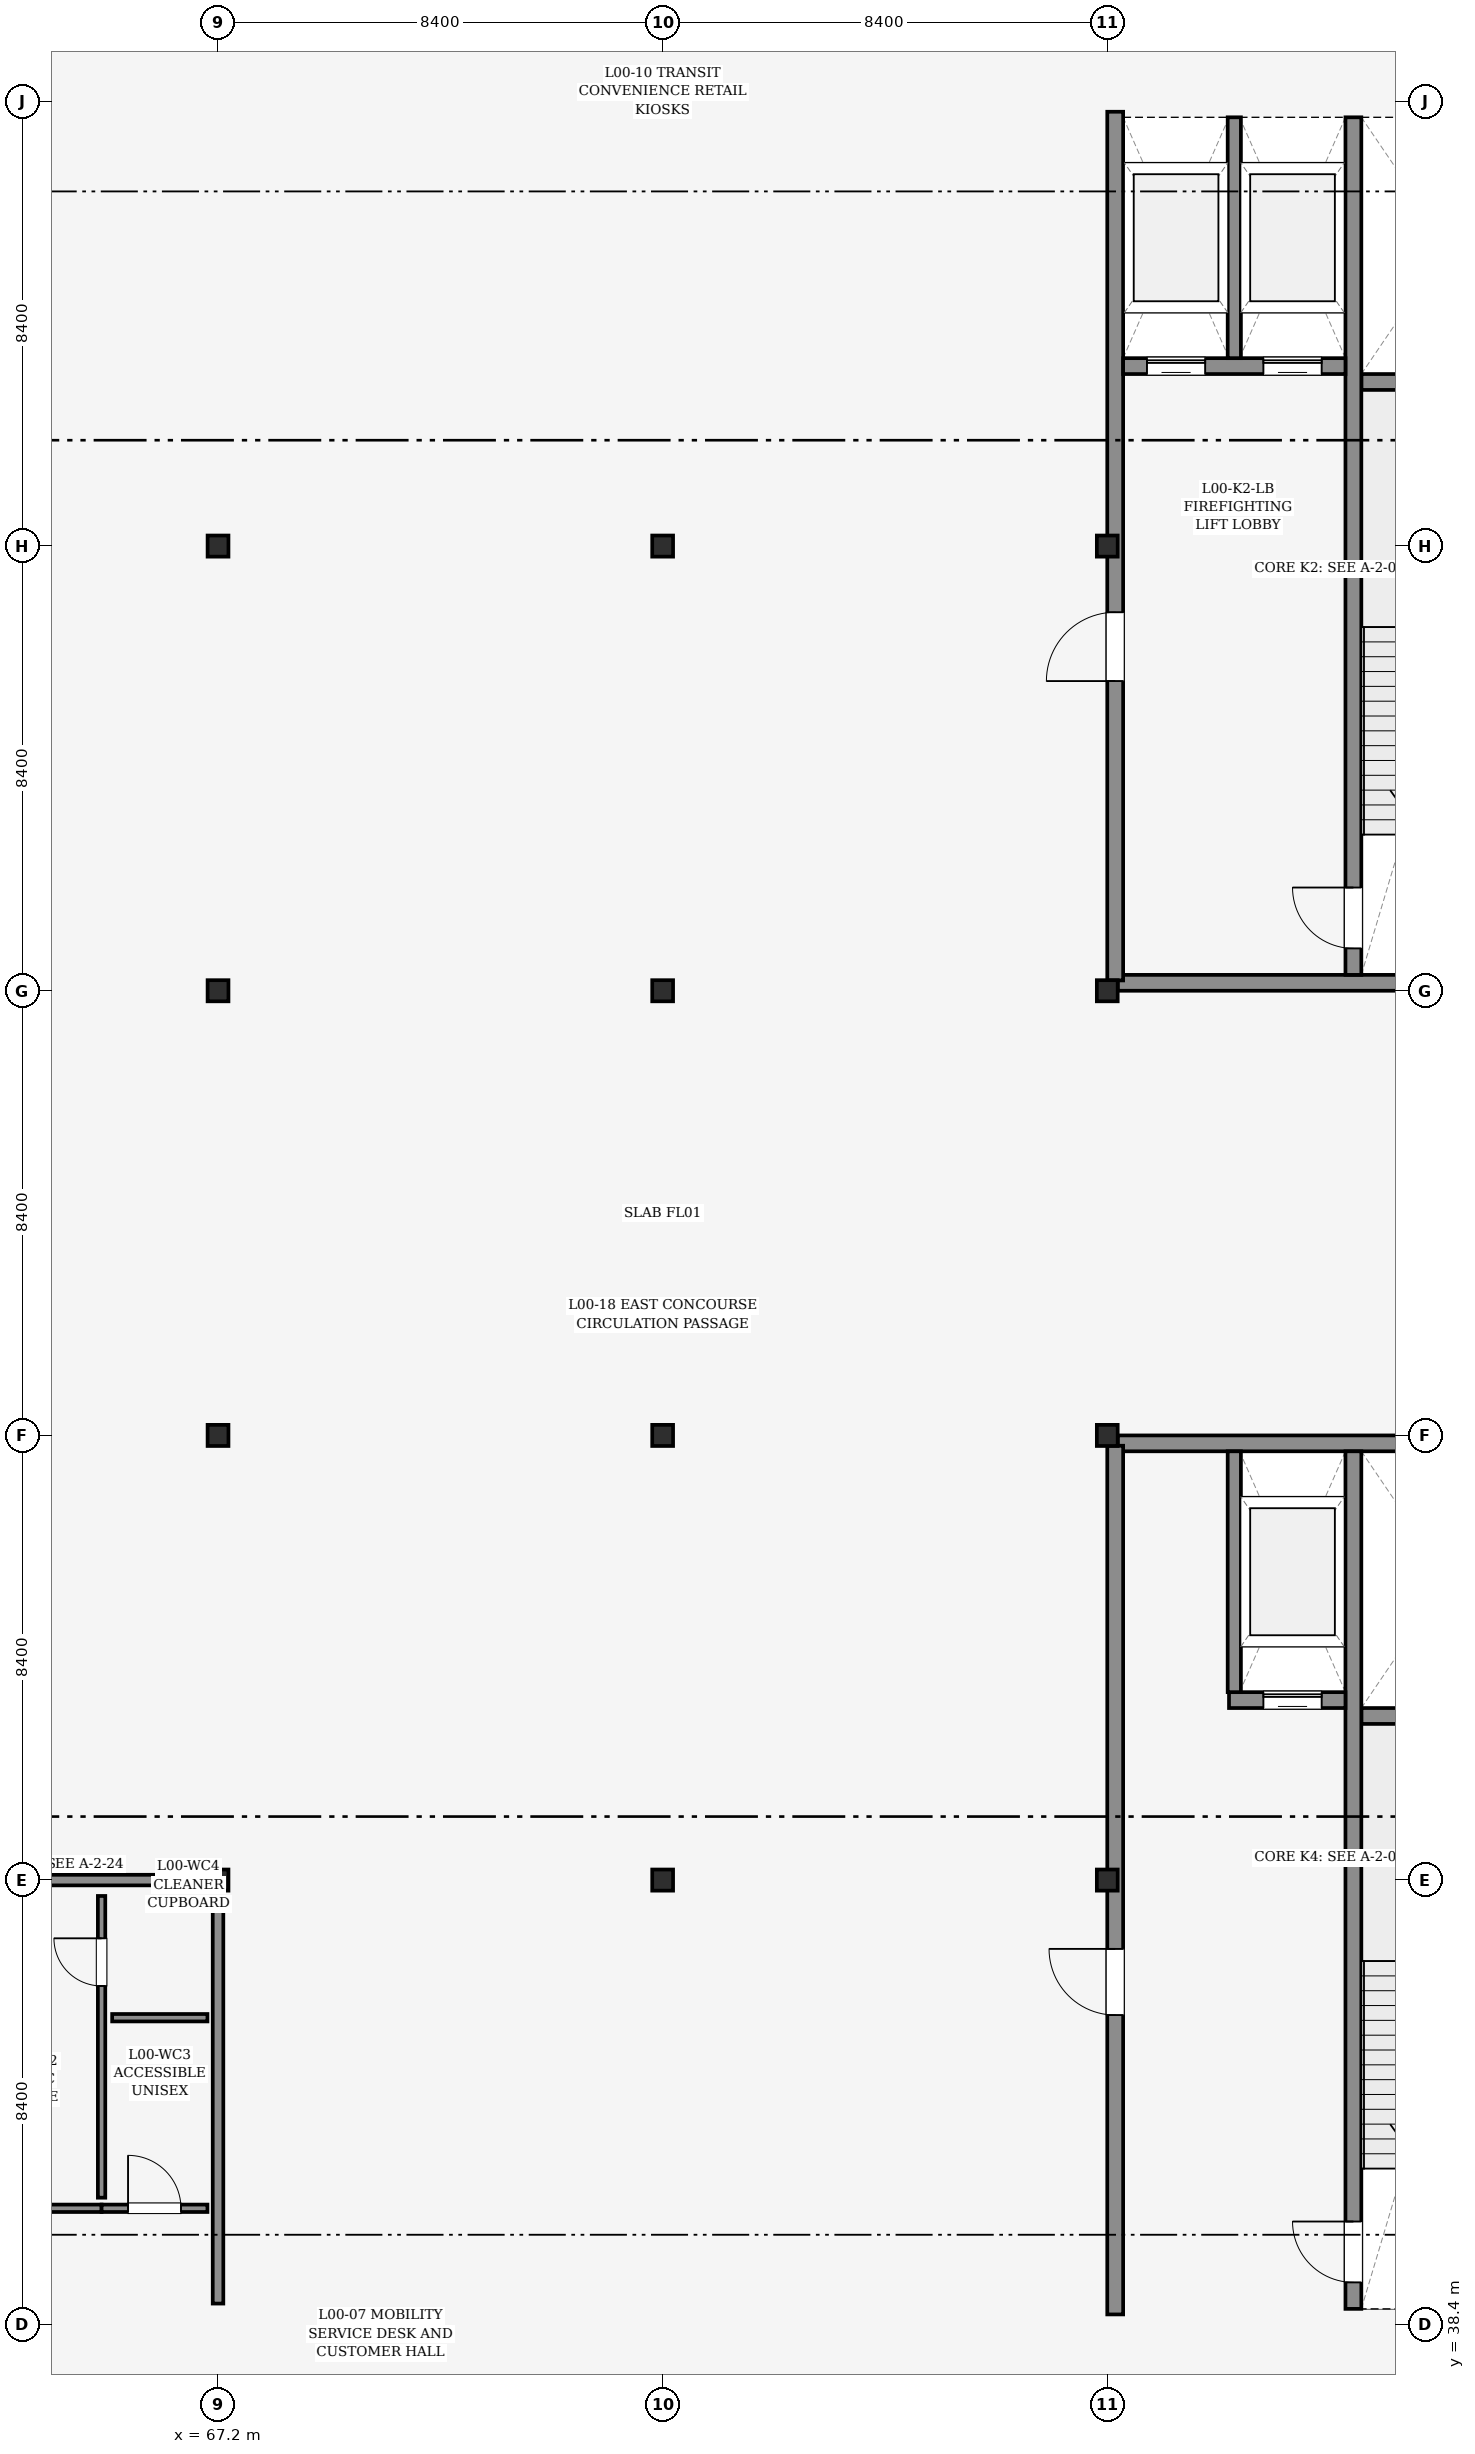
"""IFC4 building model, lengths in metres.
Left out: names, types, materials, properties, quantities, classifications, styles, units other than length and angle.
Written with IfcOpenShell. Run it as: python <this file> out.ifc"""

import sys

from ifc_helpers import new_model, si_unit, direction, frame, frame_2d, origin, origin_2d, place, context, subcontext, project, spatial, rectangle, i_section, extrude, element, fill, save


model = new_model("IFC4")
c1 = context("Model", 3, precision=1e-05, world=origin(), true_north=direction((0.0, 1.0)))
c2 = subcontext(c1, "Body", "Model", "MODEL_VIEW")
j1 = project(units=[si_unit("LENGTHUNIT", "METRE"), si_unit("PLANEANGLEUNIT", "RADIAN")], contexts=[c1])
p1 = place(None, origin())
s1 = spatial("IfcSite", under=j1, at=p1, CompositionType="ELEMENT")
p2 = place(p1, origin())
s2 = spatial("IfcBuilding", under=s1, at=p2, CompositionType="ELEMENT")
p3 = place(p2, origin())
s3 = spatial("IfcBuildingStorey", under=s2, at=p3, CompositionType="ELEMENT", Elevation=0.0)
for number, where, z_axis, x_axis in (
    (1, (67.2, 38.4, 0.0), (0.0, 0.0, 1.0), (1.0, 0.0, 0.0)),
    (2, (67.2, 46.8, 0.0), (0.0, 0.0, 1.0), (1.0, 0.0, 0.0)),
    (3, (67.2, 55.2, 0.0), (0.0, 0.0, 1.0), (1.0, 0.0, 0.0)),
    (4, (67.2, 63.6, 0.0), (0.0, 0.0, 1.0), (1.0, 0.0, 0.0)),
    (5, (67.2, 72.0, 0.0), (0.0, 0.0, 1.0), (1.0, 0.0, 0.0)),
    (6, (67.2, 80.4, 0.0), (0.0, 0.0, 1.0), (1.0, 0.0, 0.0)),
    (7, (75.6, 38.4, 0.0), (0.0, 0.0, 1.0), (1.0, 0.0, 0.0)),
    (8, (75.6, 46.8, 0.0), (0.0, 0.0, 1.0), (1.0, 0.0, 0.0)),
    (9, (75.6, 55.2, 0.0), (0.0, 0.0, 1.0), (1.0, 0.0, 0.0)),
    (10, (75.6, 63.6, 0.0), (0.0, 0.0, 1.0), (1.0, 0.0, 0.0)),
    (11, (75.6, 72.0, 0.0), (0.0, 0.0, 1.0), (1.0, 0.0, 0.0)),
    (12, (75.6, 80.4, 0.0), (0.0, 0.0, 1.0), (1.0, 0.0, 0.0)),
    (13, (84.0, 38.4, 0.0), (0.0, 0.0, 1.0), (1.0, 0.0, 0.0)),
    (14, (84.0, 46.8, 0.0), (0.0, 0.0, 1.0), (1.0, 0.0, 0.0)),
    (15, (84.0, 55.2, 0.0), (0.0, 0.0, 1.0), (1.0, 0.0, 0.0)),
    (16, (84.0, 63.6, 0.0), (0.0, 0.0, 1.0), (1.0, 0.0, 0.0)),
    (17, (84.0, 72.0, 0.0), (0.0, 0.0, 1.0), (1.0, 0.0, 0.0)),
    (18, (84.0, 80.4, 0.0), (0.0, 0.0, 1.0), (1.0, 0.0, 0.0)),
):
    element("IfcColumn", number, at=place(p3, frame(where, z_axis=z_axis, x_axis=x_axis)), inside=s3, PredefinedType="COLUMN", context=c2, shape_type="SweptSolid", body=[
        extrude(i_section(OverallWidth=0.399, OverallDepth=0.394, WebThickness=0.023, FlangeThickness=0.037, FilletRadius=0.015, at=origin_2d()), origin(), (0.0, 0.0, 1.0), 5.4),
    ])
for number, where, z_axis, x_axis in (
    (19, (84.198, 63.75, 0.0), (0.0, 0.0, 1.0), (1.0, 0.0, 0.0)),
    (20, (84.198, 80.25, 0.0), (0.0, 0.0, 1.0), (1.0, 0.0, 0.0)),
):
    element("IfcWall", number, at=place(p3, frame(where, z_axis=z_axis, x_axis=x_axis)), inside=s3, PredefinedType="SHEAR", context=c2, shape_type="SweptSolid", body=[
        extrude(rectangle(XDim=8.005, YDim=0.3, at=frame_2d((4.002, 0.0))), origin(), (0.0, 0.0, 1.0), 5.18),
    ])
p4 = place(p3, frame((88.8, 75.1, 0.0), z_axis=(0.0, 0.0, 1.0), x_axis=(1.0, 0.0, 0.0)))
e21 = element("IfcWall", 21, at=p4, inside=s3, PredefinedType="SHEAR", context=c2, shape_type="SweptSolid", body=[
    extrude(rectangle(XDim=3.3, YDim=0.3, at=frame_2d((1.65, 0.0))), origin(), (0.0, 0.0, 1.0), 5.18),
])
p5 = place(p3, frame((84.15, 63.795, 0.0), z_axis=(0.0, 0.0, 1.0), x_axis=(0.0, 1.0, 0.0)))
e22 = element("IfcWall", 22, at=p5, inside=s3, PredefinedType="SHEAR", context=c2, shape_type="SweptSolid", body=[
    extrude(rectangle(XDim=16.41, YDim=0.3, at=frame_2d((8.205, 0.0))), origin(), (0.0, 0.0, 1.0), 5.18),
])
p6 = place(p5, frame((5.655, 0.0, 0.0)))
e23 = element("IfcOpeningElement", 23, at=p6, cuts=e22, PredefinedType="OPENING", context=c2, shape_type="SweptSolid", body=[
    extrude(rectangle(XDim=1.3, YDim=2.2, at=frame_2d((0.65, 1.1))), frame((0.0, 0.16, 0.0), z_axis=(0.0, -1.0, 0.0), x_axis=(1.0, 0.0, 0.0)), (0.0, 0.0, 1.0), 0.32),
])
p7 = place(p3, frame((88.65, 63.9, 0.0), z_axis=(0.0, 0.0, 1.0), x_axis=(0.0, 1.0, 0.0)))
e24 = element("IfcWall", 24, at=p7, inside=s3, PredefinedType="SHEAR", context=c2, shape_type="SweptSolid", body=[
    extrude(rectangle(XDim=16.2, YDim=0.3, at=frame_2d((8.1, 0.0))), origin(), (0.0, 0.0, 1.0), 5.18),
])
p8 = place(p7, frame((0.5, 0.0, 0.0)))
e25 = element("IfcOpeningElement", 25, at=p8, cuts=e24, PredefinedType="OPENING", context=c2, shape_type="SweptSolid", body=[
    extrude(rectangle(XDim=1.15, YDim=2.15, at=frame_2d((0.575, 1.075))), frame((0.0, 0.16, 0.0), z_axis=(0.0, -1.0, 0.0), x_axis=(1.0, 0.0, 0.0)), (0.0, 0.0, 1.0), 0.32),
])
p9 = place(p3, frame((84.3, 75.4, 0.0), z_axis=(0.0, 0.0, 1.0), x_axis=(1.0, 0.0, 0.0)))
e26 = element("IfcWall", 26, at=p9, inside=s3, PredefinedType="SHEAR", context=c2, shape_type="SweptSolid", body=[
    extrude(rectangle(XDim=4.2, YDim=0.3, at=frame_2d((2.1, 0.0))), origin(), (0.0, 0.0, 1.0), 5.18),
])
p10 = place(p9, frame((0.45, 0.0, 0.0)))
e27 = element("IfcOpeningElement", 27, at=p10, cuts=e26, PredefinedType="OPENING", context=c2, shape_type="SweptSolid", body=[
    extrude(rectangle(XDim=1.1, YDim=2.2, at=frame_2d((0.55, 1.1))), frame((0.0, 0.16, 0.0), z_axis=(0.0, -1.0, 0.0), x_axis=(1.0, 0.0, 0.0)), (0.0, 0.0, 1.0), 0.32),
])
p11 = place(p9, frame((2.65, 0.0, 0.0)))
e28 = element("IfcOpeningElement", 28, at=p11, cuts=e26, PredefinedType="OPENING", context=c2, shape_type="SweptSolid", body=[
    extrude(rectangle(XDim=1.1, YDim=2.2, at=frame_2d((0.55, 1.1))), frame((0.0, 0.16, 0.0), z_axis=(0.0, -1.0, 0.0), x_axis=(1.0, 0.0, 0.0)), (0.0, 0.0, 1.0), 0.32),
])
p12 = place(p3, frame((86.4, 75.55, 0.0), z_axis=(0.0, 0.0, 1.0), x_axis=(0.0, 1.0, 0.0)))
e29 = element("IfcWall", 29, at=p12, inside=s3, PredefinedType="PARTITIONING", context=c2, shape_type="SweptSolid", body=[
    extrude(rectangle(XDim=4.55, YDim=0.25, at=frame_2d((2.275, 0.0))), origin(), (0.0, 0.0, 1.0), 4.325),
])
for number, where, z_axis, x_axis in (
    (30, (84.198, 38.55, 0.0), (0.0, 0.0, 1.0), (1.0, 0.0, 0.0)),
    (31, (84.198, 55.05, 0.0), (0.0, 0.0, 1.0), (1.0, 0.0, 0.0)),
):
    element("IfcWall", number, at=place(p3, frame(where, z_axis=z_axis, x_axis=x_axis)), inside=s3, PredefinedType="SHEAR", context=c2, shape_type="SweptSolid", body=[
        extrude(rectangle(XDim=8.005, YDim=0.3, at=frame_2d((4.002, 0.0))), origin(), (0.0, 0.0, 1.0), 5.18),
    ])
p13 = place(p3, frame((88.8, 49.9, 0.0), z_axis=(0.0, 0.0, 1.0), x_axis=(1.0, 0.0, 0.0)))
e32 = element("IfcWall", 32, at=p13, inside=s3, PredefinedType="SHEAR", context=c2, shape_type="SweptSolid", body=[
    extrude(rectangle(XDim=3.3, YDim=0.3, at=frame_2d((1.65, 0.0))), origin(), (0.0, 0.0, 1.0), 5.18),
])
p14 = place(p3, frame((84.15, 38.595, 0.0), z_axis=(0.0, 0.0, 1.0), x_axis=(0.0, 1.0, 0.0)))
e33 = element("IfcWall", 33, at=p14, inside=s3, PredefinedType="SHEAR", context=c2, shape_type="SweptSolid", body=[
    extrude(rectangle(XDim=16.41, YDim=0.3, at=frame_2d((8.205, 0.0))), origin(), (0.0, 0.0, 1.0), 5.18),
])
p15 = place(p14, frame((5.655, 0.0, 0.0)))
e34 = element("IfcOpeningElement", 34, at=p15, cuts=e33, PredefinedType="OPENING", context=c2, shape_type="SweptSolid", body=[
    extrude(rectangle(XDim=1.25, YDim=2.15, at=frame_2d((0.625, 1.075))), frame((0.0, 0.16, 0.0), z_axis=(0.0, -1.0, 0.0), x_axis=(1.0, 0.0, 0.0)), (0.0, 0.0, 1.0), 0.32),
])
p16 = place(p3, frame((88.65, 38.7, 0.0), z_axis=(0.0, 0.0, 1.0), x_axis=(0.0, 1.0, 0.0)))
e35 = element("IfcWall", 35, at=p16, inside=s3, PredefinedType="SHEAR", context=c2, shape_type="SweptSolid", body=[
    extrude(rectangle(XDim=16.2, YDim=0.3, at=frame_2d((8.1, 0.0))), origin(), (0.0, 0.0, 1.0), 5.18),
])
p17 = place(p16, frame((0.5, 0.0, 0.0)))
e36 = element("IfcOpeningElement", 36, at=p17, cuts=e35, PredefinedType="OPENING", context=c2, shape_type="SweptSolid", body=[
    extrude(rectangle(XDim=1.15, YDim=2.15, at=frame_2d((0.575, 1.075))), frame((0.0, 0.16, 0.0), z_axis=(0.0, -1.0, 0.0), x_axis=(1.0, 0.0, 0.0)), (0.0, 0.0, 1.0), 0.32),
])
p18 = place(p3, frame((86.3, 50.2, 0.0), z_axis=(0.0, 0.0, 1.0), x_axis=(1.0, 0.0, 0.0)))
e37 = element("IfcWall", 37, at=p18, inside=s3, PredefinedType="SHEAR", context=c2, shape_type="SweptSolid", body=[
    extrude(rectangle(XDim=2.2, YDim=0.3, at=frame_2d((1.1, 0.0))), origin(), (0.0, 0.0, 1.0), 5.18),
])
p19 = place(p18, frame((0.65, 0.0, 0.0)))
e38 = element("IfcOpeningElement", 38, at=p19, cuts=e37, PredefinedType="OPENING", context=c2, shape_type="SweptSolid", body=[
    extrude(rectangle(XDim=1.1, YDim=2.2, at=frame_2d((0.55, 1.1))), frame((0.0, 0.16, 0.0), z_axis=(0.0, -1.0, 0.0), x_axis=(1.0, 0.0, 0.0)), (0.0, 0.0, 1.0), 0.32),
])
p20 = place(p3, frame((86.4, 50.35, 0.0), z_axis=(0.0, 0.0, 1.0), x_axis=(0.0, 1.0, 0.0)))
e39 = element("IfcWall", 39, at=p20, inside=s3, PredefinedType="PARTITIONING", context=c2, shape_type="SweptSolid", body=[
    extrude(rectangle(XDim=4.55, YDim=0.25, at=frame_2d((2.275, 0.0))), origin(), (0.0, 0.0, 1.0), 4.325),
])
p21 = place(p3, frame((59.2, 38.4, 0.0), z_axis=(0.0, 0.0, 1.0), x_axis=(1.0, 0.0, 0.0)))
e40 = element("IfcWall", 40, at=p21, inside=s3, PredefinedType="PARTITIONING", context=c2, shape_type="SweptSolid", body=[
    extrude(rectangle(XDim=7.6, YDim=0.2, at=frame_2d((3.8, 0.0))), origin(), (0.0, 0.0, 1.0), 4.325),
])
p22 = place(p21, frame((3.2, 0.0, 0.0)))
e41 = element("IfcOpeningElement", 41, at=p22, cuts=e40, PredefinedType="OPENING", context=c2, shape_type="SweptSolid", body=[
    extrude(rectangle(XDim=0.92, YDim=2.1, at=frame_2d((0.46, 1.05))), frame((0.0, 0.11, 0.0), z_axis=(0.0, -1.0, 0.0), x_axis=(1.0, 0.0, 0.0)), (0.0, 0.0, 1.0), 0.22),
])
p23 = place(p3, frame((59.2, 46.8, 0.0), z_axis=(0.0, 0.0, 1.0), x_axis=(1.0, 0.0, 0.0)))
e42 = element("IfcWall", 42, at=p23, inside=s3, PredefinedType="PARTITIONING", context=c2, shape_type="SweptSolid", body=[
    extrude(rectangle(XDim=7.6, YDim=0.2, at=frame_2d((3.8, 0.0))), origin(), (0.0, 0.0, 1.0), 4.325),
])
p24 = place(p3, frame((67.2, 38.8, 0.0), z_axis=(0.0, 0.0, 1.0), x_axis=(0.0, 1.0, 0.0)))
e43 = element("IfcWall", 43, at=p24, inside=s3, PredefinedType="PARTITIONING", context=c2, shape_type="SweptSolid", body=[
    extrude(rectangle(XDim=7.6, YDim=0.2, at=frame_2d((3.8, 0.0))), origin(), (0.0, 0.0, 1.0), 4.325),
])
p25 = place(p3, frame((62.0, 40.6, 0.0), z_axis=(0.0, 0.0, 1.0), x_axis=(1.0, 0.0, 0.0)))
e44 = element("IfcWall", 44, at=p25, inside=s3, PredefinedType="PARTITIONING", context=c2, shape_type="SweptSolid", body=[
    extrude(rectangle(XDim=3.0, YDim=0.14, at=frame_2d((1.5, 0.0))), origin(), (0.0, 0.0, 1.0), 4.325),
])
p26 = place(p25, frame((1.0, 0.0, 0.0)))
e45 = element("IfcOpeningElement", 45, at=p26, cuts=e44, PredefinedType="OPENING", context=c2, shape_type="SweptSolid", body=[
    extrude(rectangle(XDim=1.0, YDim=2.1, at=frame_2d((0.5, 1.05))), frame((0.0, 0.08, 0.0), z_axis=(0.0, -1.0, 0.0), x_axis=(1.0, 0.0, 0.0)), (0.0, 0.0, 1.0), 0.16),
])
p27 = place(p3, frame((65.0, 40.6, 0.0), z_axis=(0.0, 0.0, 1.0), x_axis=(1.0, 0.0, 0.0)))
e46 = element("IfcWall", 46, at=p27, inside=s3, PredefinedType="PARTITIONING", context=c2, shape_type="SweptSolid", body=[
    extrude(rectangle(XDim=2.0, YDim=0.14, at=frame_2d((1.0, 0.0))), origin(), (0.0, 0.0, 1.0), 4.325),
])
p28 = place(p27, frame((0.5, 0.0, 0.0)))
e47 = element("IfcOpeningElement", 47, at=p28, cuts=e46, PredefinedType="OPENING", context=c2, shape_type="SweptSolid", body=[
    extrude(rectangle(XDim=1.0, YDim=2.1, at=frame_2d((0.5, 1.05))), frame((0.0, 0.08, 0.0), z_axis=(0.0, -1.0, 0.0), x_axis=(1.0, 0.0, 0.0)), (0.0, 0.0, 1.0), 0.16),
])
p29 = place(p3, frame((65.0, 40.8, 0.0), z_axis=(0.0, 0.0, 1.0), x_axis=(0.0, 1.0, 0.0)))
e48 = element("IfcWall", 48, at=p29, inside=s3, PredefinedType="PARTITIONING", context=c2, shape_type="SweptSolid", body=[
    extrude(rectangle(XDim=5.7, YDim=0.14, at=frame_2d((2.85, 0.0))), origin(), (0.0, 0.0, 1.0), 4.325),
])
p30 = place(p29, frame((4.0, 0.0, 0.0)))
e49 = element("IfcOpeningElement", 49, at=p30, cuts=e48, PredefinedType="OPENING", context=c2, shape_type="SweptSolid", body=[
    extrude(rectangle(XDim=0.9, YDim=2.05, at=frame_2d((0.45, 1.025))), frame((0.0, 0.08, 0.0), z_axis=(0.0, -1.0, 0.0), x_axis=(1.0, 0.0, 0.0)), (0.0, 0.0, 1.0), 0.16),
])
p31 = place(p3, frame((65.2, 44.2, 0.0), z_axis=(0.0, 0.0, 1.0), x_axis=(1.0, 0.0, 0.0)))
e50 = element("IfcWall", 50, at=p31, inside=s3, PredefinedType="PARTITIONING", context=c2, shape_type="SweptSolid", body=[
    extrude(rectangle(XDim=1.8, YDim=0.14, at=frame_2d((0.9, 0.0))), origin(), (0.0, 0.0, 1.0), 4.325),
])
p32 = place(p6, origin())
e51 = element("IfcDoor", 51, at=p32, inside=s3, OperationType="SINGLE_SWING_LEFT", PredefinedType="DOOR", context=c2, shape_type="SweptSolid", body=[
    extrude(rectangle(XDim=1.3, YDim=2.2, at=frame_2d((0.65, 1.1))), frame((0.0, 0.025, 0.0), z_axis=(0.0, -1.0, 0.0), x_axis=(1.0, 0.0, 0.0)), (0.0, 0.0, 1.0), 0.05),
])
fill(e23, e51)
p33 = place(p8, origin())
e52 = element("IfcDoor", 52, at=p33, inside=s3, OperationType="SINGLE_SWING_RIGHT", PredefinedType="DOOR", context=c2, shape_type="SweptSolid", body=[
    extrude(rectangle(XDim=1.15, YDim=2.15, at=frame_2d((0.575, 1.075))), frame((0.0, 0.025, 0.0), z_axis=(0.0, -1.0, 0.0), x_axis=(1.0, 0.0, 0.0)), (0.0, 0.0, 1.0), 0.05),
])
fill(e25, e52)
p34 = place(p10, origin())
e53 = element("IfcDoor", 53, at=p34, inside=s3, OperationType="SLIDING_TO_LEFT", PredefinedType="DOOR", context=c2, shape_type="SweptSolid", body=[
    extrude(rectangle(XDim=1.1, YDim=2.2, at=frame_2d((0.55, 1.1))), frame((0.0, 0.025, 0.0), z_axis=(0.0, -1.0, 0.0), x_axis=(1.0, 0.0, 0.0)), (0.0, 0.0, 1.0), 0.05),
])
fill(e27, e53)
p35 = place(p11, origin())
e54 = element("IfcDoor", 54, at=p35, inside=s3, OperationType="SLIDING_TO_LEFT", PredefinedType="DOOR", context=c2, shape_type="SweptSolid", body=[
    extrude(rectangle(XDim=1.1, YDim=2.2, at=frame_2d((0.55, 1.1))), frame((0.0, 0.025, 0.0), z_axis=(0.0, -1.0, 0.0), x_axis=(1.0, 0.0, 0.0)), (0.0, 0.0, 1.0), 0.05),
])
fill(e28, e54)
p36 = place(p15, origin())
e55 = element("IfcDoor", 55, at=p36, inside=s3, OperationType="SINGLE_SWING_RIGHT", PredefinedType="DOOR", context=c2, shape_type="SweptSolid", body=[
    extrude(rectangle(XDim=1.25, YDim=2.15, at=frame_2d((0.625, 1.075))), frame((0.0, 0.025, 0.0), z_axis=(0.0, -1.0, 0.0), x_axis=(1.0, 0.0, 0.0)), (0.0, 0.0, 1.0), 0.05),
])
fill(e34, e55)
p37 = place(p17, origin())
e56 = element("IfcDoor", 56, at=p37, inside=s3, OperationType="SINGLE_SWING_RIGHT", PredefinedType="DOOR", context=c2, shape_type="SweptSolid", body=[
    extrude(rectangle(XDim=1.15, YDim=2.15, at=frame_2d((0.575, 1.075))), frame((0.0, 0.025, 0.0), z_axis=(0.0, -1.0, 0.0), x_axis=(1.0, 0.0, 0.0)), (0.0, 0.0, 1.0), 0.05),
])
fill(e36, e56)
p38 = place(p19, origin())
e57 = element("IfcDoor", 57, at=p38, inside=s3, OperationType="SLIDING_TO_LEFT", PredefinedType="DOOR", context=c2, shape_type="SweptSolid", body=[
    extrude(rectangle(XDim=1.1, YDim=2.2, at=frame_2d((0.55, 1.1))), frame((0.0, 0.025, 0.0), z_axis=(0.0, -1.0, 0.0), x_axis=(1.0, 0.0, 0.0)), (0.0, 0.0, 1.0), 0.05),
])
fill(e38, e57)
p39 = place(p28, origin())
e58 = element("IfcDoor", 58, at=p39, inside=s3, OperationType="SINGLE_SWING_LEFT", PredefinedType="DOOR", context=c2, shape_type="SweptSolid", body=[
    extrude(rectangle(XDim=1.0, YDim=2.1, at=frame_2d((0.5, 1.05))), frame((0.0, 0.025, 0.0), z_axis=(0.0, -1.0, 0.0), x_axis=(1.0, 0.0, 0.0)), (0.0, 0.0, 1.0), 0.05),
])
fill(e47, e58)
p40 = place(p30, origin())
e59 = element("IfcDoor", 59, at=p40, inside=s3, OperationType="SINGLE_SWING_RIGHT", PredefinedType="DOOR", context=c2, shape_type="SweptSolid", body=[
    extrude(rectangle(XDim=0.9, YDim=2.05, at=frame_2d((0.45, 1.025))), frame((0.0, 0.025, 0.0), z_axis=(0.0, -1.0, 0.0), x_axis=(1.0, 0.0, 0.0)), (0.0, 0.0, 1.0), 0.05),
])
fill(e49, e59)
save(model, sys.argv[1])
